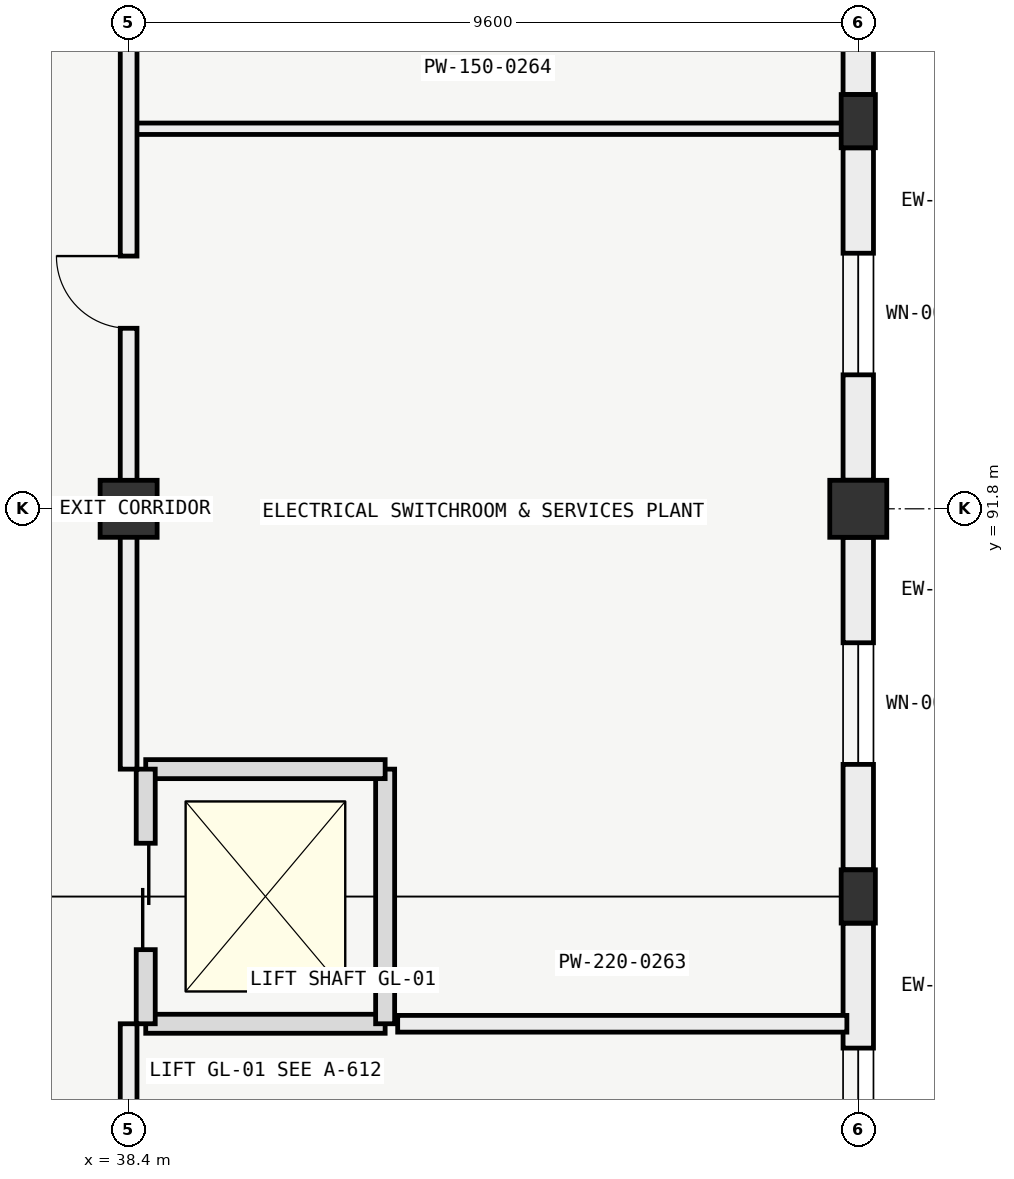
"""IFC4 building model, lengths in metres.
Left out: names, types, materials, properties, quantities, classifications, styles, units other than length and angle.
Written with IfcOpenShell. Run it as: python <this file> out.ifc"""

import sys

from ifc_helpers import new_model, si_unit, direction, frame, frame_2d, origin, origin_2d, place, context, subcontext, project, spatial, rectangle, extrude, element, fill, save


model = new_model("IFC4")
c1 = context("Model", 3, precision=1e-05, world=origin(), true_north=direction((0.0, 1.0)))
c2 = subcontext(c1, "Body", "Model", "MODEL_VIEW")
j1 = project(units=[si_unit("LENGTHUNIT", "METRE"), si_unit("PLANEANGLEUNIT", "RADIAN")], contexts=[c1])
p1 = place(None, origin())
s1 = spatial("IfcSite", under=j1, at=p1, CompositionType="ELEMENT")
p2 = place(p1, origin())
s2 = spatial("IfcBuilding", under=s1, at=p2, CompositionType="ELEMENT")
p3 = place(p2, origin())
s3 = spatial("IfcBuildingStorey", under=s2, at=p3, CompositionType="ELEMENT", Elevation=0.0)
for number, where, z_axis, x_axis in (
    (1, (38.4, 91.8, 0.0), (0.0, 0.0, 1.0), (1.0, 0.0, 0.0)),
    (2, (48.0, 91.8, 0.0), (0.0, 0.0, 1.0), (1.0, 0.0, 0.0)),
):
    element("IfcColumn", number, at=place(p3, frame(where, z_axis=z_axis, x_axis=x_axis)), inside=s3, PredefinedType="COLUMN", context=c2, shape_type="SweptSolid", body=[
        extrude(rectangle(XDim=0.75, YDim=0.75, at=origin_2d()), origin(), (0.0, 0.0, 1.0), 5.4),
    ])
for number, where, z_axis, x_axis in (
    (3, (48.0, 86.7, 0.0), (0.0, 0.0, 1.0), (1.0, 0.0, 0.0)),
    (4, (48.0, 96.9, 0.0), (0.0, 0.0, 1.0), (1.0, 0.0, 0.0)),
):
    element("IfcColumn", number, at=place(p3, frame(where, z_axis=z_axis, x_axis=x_axis)), inside=s3, PredefinedType="PILASTER", context=c2, shape_type="SweptSolid", body=[
        extrude(rectangle(XDim=0.45, YDim=0.7, at=origin_2d()), origin(), (0.0, 0.0, 1.0), 5.4),
    ])
p4 = place(p3, frame((48.0, 86.349, 0.0), z_axis=(0.0, 0.0, 1.0), x_axis=(0.0, -1.0, 0.0)))
e5 = element("IfcWall", 5, at=p4, inside=s3, PredefinedType="SOLIDWALL", context=c2, shape_type="SweptSolid", body=[
    extrude(rectangle(XDim=4.373, YDim=0.4, at=frame_2d((2.187, 0.0))), origin(), (0.0, 0.0, 1.0), 4.45),
])
p5 = place(p4, frame((1.644, 0.0, 0.95)))
e6 = element("IfcOpeningElement", 6, at=p5, cuts=e5, PredefinedType="OPENING", context=c2, shape_type="SweptSolid", body=[
    extrude(rectangle(XDim=1.6, YDim=1.9, at=frame_2d((0.8, 0.95))), frame((0.0, 0.21, 0.0), z_axis=(0.0, -1.0, 0.0), x_axis=(1.0, 0.0, 0.0)), (0.0, 0.0, 1.0), 0.42),
])
p6 = place(p3, frame((48.0, 91.424, 0.0), z_axis=(0.0, 0.0, 1.0), x_axis=(0.0, -1.0, 0.0)))
e7 = element("IfcWall", 7, at=p6, inside=s3, PredefinedType="SOLIDWALL", context=c2, shape_type="SweptSolid", body=[
    extrude(rectangle(XDim=4.373, YDim=0.4, at=frame_2d((2.187, 0.0))), origin(), (0.0, 0.0, 1.0), 4.45),
])
p7 = place(p6, frame((1.386, 0.0, 0.95)))
e8 = element("IfcOpeningElement", 8, at=p7, cuts=e7, PredefinedType="OPENING", context=c2, shape_type="SweptSolid", body=[
    extrude(rectangle(XDim=1.6, YDim=1.9, at=frame_2d((0.8, 0.95))), frame((0.0, 0.21, 0.0), z_axis=(0.0, -1.0, 0.0), x_axis=(1.0, 0.0, 0.0)), (0.0, 0.0, 1.0), 0.42),
])
p8 = place(p3, frame((48.0, 96.549, 0.0), z_axis=(0.0, 0.0, 1.0), x_axis=(0.0, -1.0, 0.0)))
e9 = element("IfcWall", 9, at=p8, inside=s3, PredefinedType="SOLIDWALL", context=c2, shape_type="SweptSolid", body=[
    extrude(rectangle(XDim=4.373, YDim=0.4, at=frame_2d((2.187, 0.0))), origin(), (0.0, 0.0, 1.0), 4.45),
])
p9 = place(p8, frame((1.386, 0.0, 0.95)))
e10 = element("IfcOpeningElement", 10, at=p9, cuts=e9, PredefinedType="OPENING", context=c2, shape_type="SweptSolid", body=[
    extrude(rectangle(XDim=1.6, YDim=1.9, at=frame_2d((0.8, 0.95))), frame((0.0, 0.21, 0.0), z_axis=(0.0, -1.0, 0.0), x_axis=(1.0, 0.0, 0.0)), (0.0, 0.0, 1.0), 0.42),
])
p10 = place(p3, frame((48.0, 101.624, 0.0), z_axis=(0.0, 0.0, 1.0), x_axis=(0.0, -1.0, 0.0)))
e11 = element("IfcWall", 11, at=p10, inside=s3, PredefinedType="SOLIDWALL", context=c2, shape_type="SweptSolid", body=[
    extrude(rectangle(XDim=4.373, YDim=0.4, at=frame_2d((2.187, 0.0))), origin(), (0.0, 0.0, 1.0), 4.45),
])
p11 = place(p10, frame((1.386, 0.0, 0.95)))
e12 = element("IfcOpeningElement", 12, at=p11, cuts=e11, PredefinedType="OPENING", context=c2, shape_type="SweptSolid", body=[
    extrude(rectangle(XDim=1.6, YDim=1.9, at=frame_2d((0.8, 0.95))), frame((0.0, 0.21, 0.0), z_axis=(0.0, -1.0, 0.0), x_axis=(1.0, 0.0, 0.0)), (0.0, 0.0, 1.0), 0.42),
])
p12 = place(p3, frame((38.625, 85.025, 0.0), z_axis=(0.0, 0.0, 1.0), x_axis=(1.0, 0.0, 0.0)))
e13 = element("IfcWall", 13, at=p12, inside=s3, PredefinedType="SOLIDWALL", context=c2, shape_type="SweptSolid", body=[
    extrude(rectangle(XDim=3.15, YDim=0.25, at=frame_2d((1.575, 0.0))), origin(), (0.0, 0.0, 1.0), 5.12),
])
p13 = place(p3, frame((41.775, 85.025, 0.0), z_axis=(0.0, 0.0, 1.0), x_axis=(0.0, 1.0, 0.0)))
e14 = element("IfcWall", 14, at=p13, inside=s3, PredefinedType="SOLIDWALL", context=c2, shape_type="SweptSolid", body=[
    extrude(rectangle(XDim=3.35, YDim=0.25, at=frame_2d((1.675, 0.0))), origin(), (0.0, 0.0, 1.0), 5.12),
])
p14 = place(p3, frame((41.775, 88.375, 0.0), z_axis=(0.0, 0.0, 1.0), x_axis=(-1.0, 0.0, 0.0)))
e15 = element("IfcWall", 15, at=p14, inside=s3, PredefinedType="SOLIDWALL", context=c2, shape_type="SweptSolid", body=[
    extrude(rectangle(XDim=3.15, YDim=0.25, at=frame_2d((1.575, 0.0))), origin(), (0.0, 0.0, 1.0), 5.12),
])
p15 = place(p3, frame((38.625, 88.375, 0.0), z_axis=(0.0, 0.0, 1.0), x_axis=(0.0, -1.0, 0.0)))
e16 = element("IfcWall", 16, at=p15, inside=s3, PredefinedType="SOLIDWALL", context=c2, shape_type="SweptSolid", body=[
    extrude(rectangle(XDim=3.35, YDim=0.25, at=frame_2d((1.675, 0.0))), origin(), (0.0, 0.0, 1.0), 5.12),
])
p16 = place(p15, frame((0.975, 0.0, 0.0)))
e17 = element("IfcOpeningElement", 17, at=p16, cuts=e16, PredefinedType="OPENING", context=c2, shape_type="SweptSolid", body=[
    extrude(rectangle(XDim=1.4, YDim=2.2, at=frame_2d((0.7, 1.1))), frame((0.0, 0.135, 0.0), z_axis=(0.0, -1.0, 0.0), x_axis=(1.0, 0.0, 0.0)), (0.0, 0.0, 1.0), 0.27),
])
p17 = place(p3, frame((38.4, 75.4, 0.0), z_axis=(0.0, 0.0, 1.0), x_axis=(0.0, 1.0, 0.0)))
e18 = element("IfcWall", 18, at=p17, inside=s3, PredefinedType="PARTITIONING", context=c2, shape_type="SweptSolid", body=[
    extrude(rectangle(XDim=9.625, YDim=0.22, at=frame_2d((4.812, 0.0))), origin(), (0.0, 0.0, 1.0), 4.493),
])
p18 = place(p17, frame((3.1, 0.0, 0.0)))
e19 = element("IfcOpeningElement", 19, at=p18, cuts=e18, PredefinedType="OPENING", context=c2, shape_type="SweptSolid", body=[
    extrude(rectangle(XDim=0.95, YDim=2.1, at=frame_2d((0.475, 1.05))), frame((0.0, 0.12, 0.0), z_axis=(0.0, -1.0, 0.0), x_axis=(1.0, 0.0, 0.0)), (0.0, 0.0, 1.0), 0.24),
])
p19 = place(p3, frame((41.94, 85.025, 0.0), z_axis=(0.0, 0.0, 1.0), x_axis=(1.0, 0.0, 0.0)))
e20 = element("IfcWall", 20, at=p19, inside=s3, PredefinedType="PARTITIONING", context=c2, shape_type="SweptSolid", body=[
    extrude(rectangle(XDim=5.91, YDim=0.22, at=frame_2d((2.955, 0.0))), origin(), (0.0, 0.0, 1.0), 4.45),
])
p20 = place(p3, frame((38.4, 96.8, 0.0), z_axis=(0.0, 0.0, 1.0), x_axis=(1.0, 0.0, 0.0)))
e21 = element("IfcWall", 21, at=p20, inside=s3, PredefinedType="PARTITIONING", context=c2, shape_type="SweptSolid", body=[
    extrude(rectangle(XDim=9.45, YDim=0.15, at=frame_2d((4.725, 0.0))), origin(), (0.0, 0.0, 1.0), 4.643),
])
p21 = place(p3, frame((38.4, 88.375, 0.0), z_axis=(0.0, 0.0, 1.0), x_axis=(0.0, 1.0, 0.0)))
e22 = element("IfcWall", 22, at=p21, inside=s3, PredefinedType="PARTITIONING", context=c2, shape_type="SweptSolid", body=[
    extrude(rectangle(XDim=24.9, YDim=0.22, at=frame_2d((12.45, 0.0))), origin(), (0.0, 0.0, 1.0), 4.493),
])
p22 = place(p21, frame((5.8, 0.0, 0.0)))
e23 = element("IfcOpeningElement", 23, at=p22, cuts=e22, PredefinedType="OPENING", context=c2, shape_type="SweptSolid", body=[
    extrude(rectangle(XDim=0.95, YDim=2.1, at=frame_2d((0.475, 1.05))), frame((0.0, 0.12, 0.0), z_axis=(0.0, -1.0, 0.0), x_axis=(1.0, 0.0, 0.0)), (0.0, 0.0, 1.0), 0.24),
])
p23 = place(p21, frame((11.2, 0.0, 0.0)))
e24 = element("IfcOpeningElement", 24, at=p23, cuts=e22, PredefinedType="OPENING", context=c2, shape_type="SweptSolid", body=[
    extrude(rectangle(XDim=0.95, YDim=2.1, at=frame_2d((0.475, 1.05))), frame((0.0, 0.12, 0.0), z_axis=(0.0, -1.0, 0.0), x_axis=(1.0, 0.0, 0.0)), (0.0, 0.0, 1.0), 0.24),
])
p24 = place(p21, frame((20.6, 0.0, 0.0)))
e25 = element("IfcOpeningElement", 25, at=p24, cuts=e22, PredefinedType="OPENING", context=c2, shape_type="SweptSolid", body=[
    extrude(rectangle(XDim=0.95, YDim=2.1, at=frame_2d((0.475, 1.05))), frame((0.0, 0.12, 0.0), z_axis=(0.0, -1.0, 0.0), x_axis=(1.0, 0.0, 0.0)), (0.0, 0.0, 1.0), 0.24),
])
p25 = place(p5, origin())
e26 = element("IfcWindow", 26, at=p25, inside=s3, PartitioningType="SINGLE_PANEL", PredefinedType="WINDOW", context=c2, shape_type="SweptSolid", body=[
    extrude(rectangle(XDim=1.6, YDim=1.9, at=frame_2d((0.8, 0.95))), frame((0.0, 0.03, 0.0), z_axis=(0.0, -1.0, 0.0), x_axis=(1.0, 0.0, 0.0)), (0.0, 0.0, 1.0), 0.06),
])
fill(e6, e26)
p26 = place(p7, origin())
e27 = element("IfcWindow", 27, at=p26, inside=s3, PartitioningType="SINGLE_PANEL", PredefinedType="WINDOW", context=c2, shape_type="SweptSolid", body=[
    extrude(rectangle(XDim=1.6, YDim=1.9, at=frame_2d((0.8, 0.95))), frame((0.0, 0.03, 0.0), z_axis=(0.0, -1.0, 0.0), x_axis=(1.0, 0.0, 0.0)), (0.0, 0.0, 1.0), 0.06),
])
fill(e8, e27)
p27 = place(p9, origin())
e28 = element("IfcWindow", 28, at=p27, inside=s3, PartitioningType="SINGLE_PANEL", PredefinedType="WINDOW", context=c2, shape_type="SweptSolid", body=[
    extrude(rectangle(XDim=1.6, YDim=1.9, at=frame_2d((0.8, 0.95))), frame((0.0, 0.03, 0.0), z_axis=(0.0, -1.0, 0.0), x_axis=(1.0, 0.0, 0.0)), (0.0, 0.0, 1.0), 0.06),
])
fill(e10, e28)
p28 = place(p16, origin())
e29 = element("IfcDoor", 29, at=p28, inside=s3, OperationType="DOUBLE_DOOR_SLIDING", PredefinedType="DOOR", context=c2, shape_type="SweptSolid", body=[
    extrude(rectangle(XDim=1.4, YDim=2.2, at=frame_2d((0.7, 1.1))), frame((0.0, 0.025, 0.0), z_axis=(0.0, -1.0, 0.0), x_axis=(1.0, 0.0, 0.0)), (0.0, 0.0, 1.0), 0.05),
])
fill(e17, e29)
p29 = place(p22, origin())
e30 = element("IfcDoor", 30, at=p29, inside=s3, OperationType="SINGLE_SWING_RIGHT", PredefinedType="DOOR", context=c2, shape_type="SweptSolid", body=[
    extrude(rectangle(XDim=0.95, YDim=2.1, at=frame_2d((0.475, 1.05))), frame((0.0, 0.025, 0.0), z_axis=(0.0, -1.0, 0.0), x_axis=(1.0, 0.0, 0.0)), (0.0, 0.0, 1.0), 0.05),
])
fill(e23, e30)
save(model, sys.argv[1])
